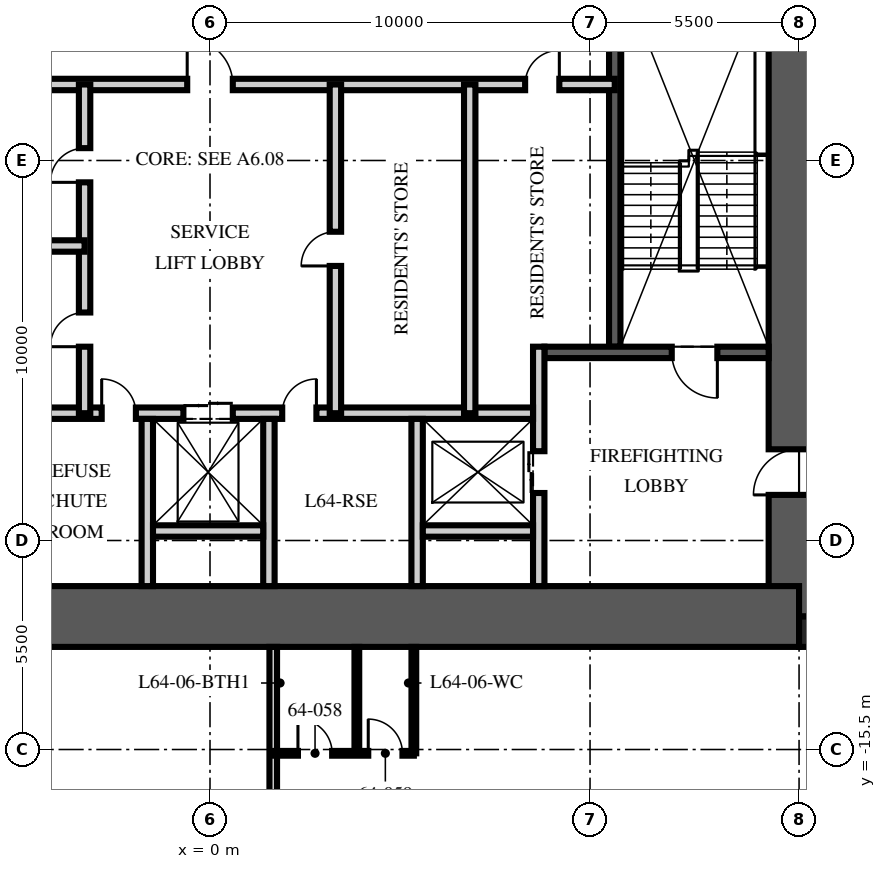
"""IFC4 building model, lengths in metres.
Left out: names, types, materials, properties, quantities, classifications, styles, units other than length and angle.
Written with IfcOpenShell. Run it as: python <this file> out.ifc"""

import sys

from ifc_helpers import new_model, si_unit, direction, frame, frame_2d, origin, origin_2d, place, context, subcontext, project, spatial, rectangle, extrude, element, fill, save


model = new_model("IFC4")
c1 = context("Model", 3, precision=1e-05, world=origin(), true_north=direction((0.0, 1.0)))
c2 = subcontext(c1, "Body", "Model", "MODEL_VIEW")
j1 = project(units=[si_unit("LENGTHUNIT", "METRE"), si_unit("PLANEANGLEUNIT", "RADIAN")], contexts=[c1])
p1 = place(None, origin())
s1 = spatial("IfcSite", under=j1, at=p1, CompositionType="ELEMENT")
p2 = place(p1, origin())
s2 = spatial("IfcBuilding", under=s1, at=p2, CompositionType="ELEMENT")
p3 = place(p2, frame((0.0, 0.0, 255.75)))
s3 = spatial("IfcBuildingStorey", under=s2, at=p3, CompositionType="ELEMENT", Elevation=255.75)
p4 = place(p3, frame((15.5, -12.0, -0.25), z_axis=(0.0, 0.0, 1.0), x_axis=(0.0, 1.0, 0.0)))
e1 = element("IfcWall", 1, at=p4, inside=s3, PredefinedType="SHEAR", context=c2, shape_type="SweptSolid", body=[
    extrude(rectangle(XDim=24.0, YDim=1.6, at=frame_2d((12.0, 0.0))), origin(), (0.0, 0.0, 1.0), 3.75),
])
p5 = place(p4, frame((3.2, 0.0, 0.25)))
e2 = element("IfcOpeningElement", 2, at=p5, cuts=e1, PredefinedType="OPENING", context=c2, shape_type="SweptSolid", body=[
    extrude(rectangle(XDim=1.2, YDim=2.1, at=frame_2d((0.6, 1.05))), frame((0.0, 0.81, 0.0), z_axis=(0.0, -1.0, 0.0), x_axis=(1.0, 0.0, 0.0)), (0.0, 0.0, 1.0), 1.62),
])
p6 = place(p4, frame((19.3, 0.0, 0.25)))
e3 = element("IfcOpeningElement", 3, at=p6, cuts=e1, PredefinedType="OPENING", context=c2, shape_type="SweptSolid", body=[
    extrude(rectangle(XDim=1.8, YDim=2.1, at=frame_2d((0.9, 1.05))), frame((0.0, 0.81, 0.0), z_axis=(0.0, -1.0, 0.0), x_axis=(1.0, 0.0, 0.0)), (0.0, 0.0, 1.0), 1.62),
])
p7 = place(p3, frame((-15.5, -12.0, -0.25), z_axis=(0.0, 0.0, 1.0), x_axis=(1.0, 0.0, 0.0)))
e4 = element("IfcWall", 4, at=p7, inside=s3, PredefinedType="SHEAR", context=c2, shape_type="SweptSolid", body=[
    extrude(rectangle(XDim=31.0, YDim=1.6, at=frame_2d((15.5, 0.0))), origin(), (0.0, 0.0, 1.0), 3.75),
])
p8 = place(p3, frame((15.9, -12.4, -0.25), z_axis=(0.0, 0.0, 1.0), x_axis=(1.0, 0.0, 0.0)))
e5 = element("IfcColumn", 5, at=p8, inside=s3, PredefinedType="COLUMN", context=c2, shape_type="SweptSolid", body=[
    extrude(rectangle(XDim=0.8, YDim=0.8, at=origin_2d()), origin(), (0.0, 0.0, 1.0), 3.75),
])
p9 = place(p3, frame((10.65, -4.9, 0.0), z_axis=(0.0, 0.0, 1.0), x_axis=(0.0, 1.0, 0.0)))
e6 = element("IfcWall", 6, at=p9, inside=s3, PredefinedType="SOLIDWALL", context=c2, shape_type="SweptSolid", body=[
    extrude(rectangle(XDim=10.1, YDim=0.3, at=frame_2d((5.05, 0.0))), origin(), (0.0, 0.0, 1.0), 3.5),
])
p10 = place(p3, frame((14.7, -5.05, 0.0), z_axis=(0.0, 0.0, 1.0), x_axis=(-1.0, 0.0, 0.0)))
e7 = element("IfcWall", 7, at=p10, inside=s3, PredefinedType="SOLIDWALL", context=c2, shape_type="SweptSolid", body=[
    extrude(rectangle(XDim=5.9, YDim=0.3, at=frame_2d((2.95, 0.0))), origin(), (0.0, 0.0, 1.0), 3.5),
])
p11 = place(p10, frame((1.35, 0.0, 0.0)))
e8 = element("IfcOpeningElement", 8, at=p11, cuts=e7, PredefinedType="OPENING", context=c2, shape_type="SweptSolid", body=[
    extrude(rectangle(XDim=1.2, YDim=2.1, at=frame_2d((0.6, 1.05))), frame((0.0, 0.16, 0.0), z_axis=(0.0, -1.0, 0.0), x_axis=(1.0, 0.0, 0.0)), (0.0, 0.0, 1.0), 0.32),
])
p12 = place(p3, frame((8.65, -11.2, 0.0), z_axis=(0.0, 0.0, 1.0), x_axis=(0.0, 1.0, 0.0)))
e9 = element("IfcWall", 9, at=p12, inside=s3, PredefinedType="PARTITIONING", context=c2, shape_type="SweptSolid", body=[
    extrude(rectangle(XDim=6.3, YDim=0.3, at=frame_2d((3.15, 0.0))), origin(), (0.0, 0.0, 1.0), 3.5),
])
p13 = place(p12, frame((2.45, 0.0, 0.0)))
e10 = element("IfcOpeningElement", 10, at=p13, cuts=e9, PredefinedType="OPENING", context=c2, shape_type="SweptSolid", body=[
    extrude(rectangle(XDim=1.1, YDim=2.1, at=frame_2d((0.55, 1.05))), frame((0.0, 0.16, 0.0), z_axis=(0.0, -1.0, 0.0), x_axis=(1.0, 0.0, 0.0)), (0.0, 0.0, 1.0), 0.32),
])
p14 = place(p3, frame((-8.5, -6.65, 0.0), z_axis=(0.0, 0.0, 1.0), x_axis=(1.0, 0.0, 0.0)))
e11 = element("IfcWall", 11, at=p14, inside=s3, PredefinedType="PARTITIONING", context=c2, shape_type="SweptSolid", body=[
    extrude(rectangle(XDim=17.0, YDim=0.3, at=frame_2d((8.5, 0.0))), origin(), (0.0, 0.0, 1.0), 3.5),
])
p15 = place(p14, frame((7.8, 0.0, 0.0)))
e12 = element("IfcOpeningElement", 12, at=p15, cuts=e11, PredefinedType="OPENING", context=c2, shape_type="SweptSolid", body=[
    extrude(rectangle(XDim=1.3, YDim=2.4, at=frame_2d((0.65, 1.2))), frame((0.0, 0.16, 0.0), z_axis=(0.0, -1.0, 0.0), x_axis=(1.0, 0.0, 0.0)), (0.0, 0.0, 1.0), 0.32),
])
p16 = place(p14, frame((5.65, 0.0, 0.0)))
e13 = element("IfcOpeningElement", 13, at=p16, cuts=e11, PredefinedType="OPENING", context=c2, shape_type="SweptSolid", body=[
    extrude(rectangle(XDim=0.9, YDim=2.1, at=frame_2d((0.45, 1.05))), frame((0.0, 0.16, 0.0), z_axis=(0.0, -1.0, 0.0), x_axis=(1.0, 0.0, 0.0)), (0.0, 0.0, 1.0), 0.32),
])
p17 = place(p14, frame((10.4, 0.0, 0.0)))
e14 = element("IfcOpeningElement", 14, at=p17, cuts=e11, PredefinedType="OPENING", context=c2, shape_type="SweptSolid", body=[
    extrude(rectangle(XDim=0.9, YDim=2.1, at=frame_2d((0.45, 1.05))), frame((0.0, 0.16, 0.0), z_axis=(0.0, -1.0, 0.0), x_axis=(1.0, 0.0, 0.0)), (0.0, 0.0, 1.0), 0.32),
])
for number, where, z_axis, x_axis in (
    (15, (-1.65, -11.2, 0.0), (0.0, 0.0, 1.0), (0.0, 1.0, 0.0)),
    (16, (1.55, -11.2, 0.0), (0.0, 0.0, 1.0), (0.0, 1.0, 0.0)),
    (17, (5.45, -11.2, 0.0), (0.0, 0.0, 1.0), (0.0, 1.0, 0.0)),
):
    element("IfcWall", number, at=place(p3, frame(where, z_axis=z_axis, x_axis=x_axis)), inside=s3, PredefinedType="PARTITIONING", context=c2, shape_type="SweptSolid", body=[
        extrude(rectangle(XDim=4.4, YDim=0.3, at=frame_2d((2.2, 0.0))), origin(), (0.0, 0.0, 1.0), 3.5),
    ])
for number, where, z_axis, x_axis in (
    (18, (-1.5, -9.75, 0.0), (0.0, 0.0, 1.0), (1.0, 0.0, 0.0)),
    (19, (5.6, -9.75, 0.0), (0.0, 0.0, 1.0), (1.0, 0.0, 0.0)),
):
    element("IfcWall", number, at=place(p3, frame(where, z_axis=z_axis, x_axis=x_axis)), inside=s3, PredefinedType="PARTITIONING", context=c2, shape_type="SweptSolid", body=[
        extrude(rectangle(XDim=2.9, YDim=0.3, at=frame_2d((1.45, 0.0))), origin(), (0.0, 0.0, 1.0), 3.5),
    ])
p18 = place(p3, frame((-10.65, 2.0, 0.0), z_axis=(0.0, 0.0, 1.0), x_axis=(1.0, 0.0, 0.0)))
e20 = element("IfcWall", 20, at=p18, inside=s3, PredefinedType="PARTITIONING", context=c2, shape_type="SweptSolid", body=[
    extrude(rectangle(XDim=21.3, YDim=0.3, at=frame_2d((10.65, 0.0))), origin(), (0.0, 0.0, 1.0), 3.5),
])
p19 = place(p18, frame((10.05, 0.0, 0.0)))
e21 = element("IfcOpeningElement", 21, at=p19, cuts=e20, PredefinedType="OPENING", context=c2, shape_type="SweptSolid", body=[
    extrude(rectangle(XDim=1.2, YDim=2.1, at=frame_2d((0.6, 1.05))), frame((0.0, 0.16, 0.0), z_axis=(0.0, -1.0, 0.0), x_axis=(1.0, 0.0, 0.0)), (0.0, 0.0, 1.0), 0.32),
])
p20 = place(p18, frame((18.942, 0.0, 0.0)))
e22 = element("IfcOpeningElement", 22, at=p20, cuts=e20, PredefinedType="OPENING", context=c2, shape_type="SweptSolid", body=[
    extrude(rectangle(XDim=0.9, YDim=2.1, at=frame_2d((0.45, 1.05))), frame((0.0, 0.16, 0.0), z_axis=(0.0, -1.0, 0.0), x_axis=(1.0, 0.0, 0.0)), (0.0, 0.0, 1.0), 0.32),
])
p21 = place(p3, frame((-3.3, -6.65, 0.0), z_axis=(0.0, 0.0, 1.0), x_axis=(0.0, 1.0, 0.0)))
e23 = element("IfcWall", 23, at=p21, inside=s3, PredefinedType="PARTITIONING", context=c2, shape_type="SweptSolid", body=[
    extrude(rectangle(XDim=8.65, YDim=0.3, at=frame_2d((4.325, 0.0))), origin(), (0.0, 0.0, 1.0), 3.5),
])
p22 = place(p21, frame((1.75, 0.0, 0.0)))
e24 = element("IfcOpeningElement", 24, at=p22, cuts=e23, PredefinedType="OPENING", context=c2, shape_type="SweptSolid", body=[
    extrude(rectangle(XDim=0.9, YDim=2.1, at=frame_2d((0.45, 1.05))), frame((0.0, 0.16, 0.0), z_axis=(0.0, -1.0, 0.0), x_axis=(1.0, 0.0, 0.0)), (0.0, 0.0, 1.0), 0.32),
])
p23 = place(p21, frame((6.075, 0.0, 0.0)))
e25 = element("IfcOpeningElement", 25, at=p23, cuts=e23, PredefinedType="OPENING", context=c2, shape_type="SweptSolid", body=[
    extrude(rectangle(XDim=0.9, YDim=2.1, at=frame_2d((0.45, 1.05))), frame((0.0, 0.16, 0.0), z_axis=(0.0, -1.0, 0.0), x_axis=(1.0, 0.0, 0.0)), (0.0, 0.0, 1.0), 0.32),
])
p24 = place(p3, frame((3.3, -6.65, 0.0), z_axis=(0.0, 0.0, 1.0), x_axis=(0.0, 1.0, 0.0)))
e26 = element("IfcWall", 26, at=p24, inside=s3, PredefinedType="PARTITIONING", context=c2, shape_type="SweptSolid", body=[
    extrude(rectangle(XDim=8.65, YDim=0.3, at=frame_2d((4.325, 0.0))), origin(), (0.0, 0.0, 1.0), 3.5),
])
p25 = place(p24, frame((3.875, 0.0, 0.0)))
e27 = element("IfcOpeningElement", 27, at=p25, cuts=e26, PredefinedType="OPENING", context=c2, shape_type="SweptSolid", body=[
    extrude(rectangle(XDim=0.9, YDim=2.1, at=frame_2d((0.45, 1.05))), frame((0.0, 0.16, 0.0), z_axis=(0.0, -1.0, 0.0), x_axis=(1.0, 0.0, 0.0)), (0.0, 0.0, 1.0), 0.32),
])
p26 = place(p3, frame((-10.65, -2.25, 0.0), z_axis=(0.0, 0.0, 1.0), x_axis=(1.0, 0.0, 0.0)))
e28 = element("IfcWall", 28, at=p26, inside=s3, PredefinedType="PARTITIONING", context=c2, shape_type="SweptSolid", body=[
    extrude(rectangle(XDim=7.35, YDim=0.3, at=frame_2d((3.675, 0.0))), origin(), (0.0, 0.0, 1.0), 3.5),
])
p27 = place(p3, frame((6.834, -6.65, 0.0), z_axis=(0.0, 0.0, 1.0), x_axis=(0.0, 1.0, 0.0)))
e29 = element("IfcWall", 29, at=p27, inside=s3, PredefinedType="PARTITIONING", context=c2, shape_type="SweptSolid", body=[
    extrude(rectangle(XDim=8.65, YDim=0.3, at=frame_2d((4.325, 0.0))), origin(), (0.0, 0.0, 1.0), 3.5),
])
p28 = place(p3, frame((1.664, -12.8, 0.0), z_axis=(0.0, 0.0, 1.0), x_axis=(0.0, -1.0, 0.0)))
e30 = element("IfcWall", 30, at=p28, inside=s3, PredefinedType="PARTITIONING", context=c2, shape_type="SweptSolid", body=[
    extrude(rectangle(XDim=12.9, YDim=0.2, at=frame_2d((6.45, 0.0))), origin(), (0.0, 0.0, 1.0), 2.91),
])
p29 = place(p3, frame((1.664, -15.6, 0.0), z_axis=(0.0, 0.0, 1.0), x_axis=(1.0, 0.0, 0.0)))
e31 = element("IfcWall", 31, at=p29, inside=s3, PredefinedType="PARTITIONING", context=c2, shape_type="SweptSolid", body=[
    extrude(rectangle(XDim=3.7, YDim=0.125, at=frame_2d((1.85, 0.0))), origin(), (0.0, 0.0, 1.0), 2.81),
])
p30 = place(p29, frame((0.65, 0.0, 0.0)))
e32 = element("IfcOpeningElement", 32, at=p30, cuts=e31, PredefinedType="OPENING", context=c2, shape_type="SweptSolid", body=[
    extrude(rectangle(XDim=0.9, YDim=2.1, at=frame_2d((0.45, 1.05))), frame((0.0, 0.073, 0.0), z_axis=(0.0, -1.0, 0.0), x_axis=(1.0, 0.0, 0.0)), (0.0, 0.0, 1.0), 0.145),
])
p31 = place(p29, frame((2.5, 0.0, 0.0)))
e33 = element("IfcOpeningElement", 33, at=p31, cuts=e31, PredefinedType="OPENING", context=c2, shape_type="SweptSolid", body=[
    extrude(rectangle(XDim=0.9, YDim=2.1, at=frame_2d((0.45, 1.05))), frame((0.0, 0.073, 0.0), z_axis=(0.0, -1.0, 0.0), x_axis=(1.0, 0.0, 0.0)), (0.0, 0.0, 1.0), 0.145),
])
for number, where, z_axis, x_axis in (
    (34, (3.864, -12.8, 0.0), (0.0, 0.0, 1.0), (0.0, -1.0, 0.0)),
    (35, (5.364, -12.8, 0.0), (0.0, 0.0, 1.0), (0.0, -1.0, 0.0)),
):
    element("IfcWall", number, at=place(p3, frame(where, z_axis=z_axis, x_axis=x_axis)), inside=s3, PredefinedType="PARTITIONING", context=c2, shape_type="SweptSolid", body=[
        extrude(rectangle(XDim=2.8, YDim=0.125, at=frame_2d((1.4, 0.0))), origin(), (0.0, 0.0, 1.0), 3.5),
    ])
p32 = place(p11, origin())
e36 = element("IfcDoor", 36, at=p32, inside=s3, OperationType="SINGLE_SWING_LEFT", PredefinedType="DOOR", context=c2, shape_type="SweptSolid", body=[
    extrude(rectangle(XDim=1.2, YDim=2.1, at=frame_2d((0.6, 1.05))), frame((0.0, 0.025, 0.0), z_axis=(0.0, -1.0, 0.0), x_axis=(1.0, 0.0, 0.0)), (0.0, 0.0, 1.0), 0.05),
])
fill(e8, e36)
p33 = place(p5, origin())
e37 = element("IfcDoor", 37, at=p33, inside=s3, OperationType="SINGLE_SWING_LEFT", PredefinedType="DOOR", context=c2, shape_type="SweptSolid", body=[
    extrude(rectangle(XDim=1.2, YDim=2.1, at=frame_2d((0.6, 1.05))), frame((0.0, 0.025, 0.0), z_axis=(0.0, -1.0, 0.0), x_axis=(1.0, 0.0, 0.0)), (0.0, 0.0, 1.0), 0.05),
])
fill(e2, e37)
p34 = place(p13, origin())
e38 = element("IfcDoor", 38, at=p34, inside=s3, OperationType="DOUBLE_DOOR_SLIDING", PredefinedType="DOOR", context=c2, shape_type="SweptSolid", body=[
    extrude(rectangle(XDim=1.1, YDim=2.1, at=frame_2d((0.55, 1.05))), frame((0.0, 0.025, 0.0), z_axis=(0.0, -1.0, 0.0), x_axis=(1.0, 0.0, 0.0)), (0.0, 0.0, 1.0), 0.05),
])
fill(e10, e38)
p35 = place(p15, origin())
e39 = element("IfcDoor", 39, at=p35, inside=s3, OperationType="DOUBLE_DOOR_SLIDING", PredefinedType="DOOR", context=c2, shape_type="SweptSolid", body=[
    extrude(rectangle(XDim=1.3, YDim=2.4, at=frame_2d((0.65, 1.2))), frame((0.0, 0.025, 0.0), z_axis=(0.0, -1.0, 0.0), x_axis=(1.0, 0.0, 0.0)), (0.0, 0.0, 1.0), 0.05),
])
fill(e12, e39)
p36 = place(p19, origin())
e40 = element("IfcDoor", 40, at=p36, inside=s3, OperationType="SINGLE_SWING_LEFT", PredefinedType="DOOR", context=c2, shape_type="SweptSolid", body=[
    extrude(rectangle(XDim=1.2, YDim=2.1, at=frame_2d((0.6, 1.05))), frame((0.0, 0.025, 0.0), z_axis=(0.0, -1.0, 0.0), x_axis=(1.0, 0.0, 0.0)), (0.0, 0.0, 1.0), 0.05),
])
fill(e21, e40)
p37 = place(p16, origin())
e41 = element("IfcDoor", 41, at=p37, inside=s3, OperationType="SINGLE_SWING_LEFT", PredefinedType="DOOR", context=c2, shape_type="SweptSolid", body=[
    extrude(rectangle(XDim=0.9, YDim=2.1, at=frame_2d((0.45, 1.05))), frame((0.0, 0.025, 0.0), z_axis=(0.0, -1.0, 0.0), x_axis=(1.0, 0.0, 0.0)), (0.0, 0.0, 1.0), 0.05),
])
fill(e13, e41)
p38 = place(p17, origin())
e42 = element("IfcDoor", 42, at=p38, inside=s3, OperationType="SINGLE_SWING_RIGHT", PredefinedType="DOOR", context=c2, shape_type="SweptSolid", body=[
    extrude(rectangle(XDim=0.9, YDim=2.1, at=frame_2d((0.45, 1.05))), frame((0.0, 0.025, 0.0), z_axis=(0.0, -1.0, 0.0), x_axis=(1.0, 0.0, 0.0)), (0.0, 0.0, 1.0), 0.05),
])
fill(e14, e42)
p39 = place(p22, origin())
e43 = element("IfcDoor", 43, at=p39, inside=s3, OperationType="SINGLE_SWING_LEFT", PredefinedType="DOOR", context=c2, shape_type="SweptSolid", body=[
    extrude(rectangle(XDim=0.9, YDim=2.1, at=frame_2d((0.45, 1.05))), frame((0.0, 0.025, 0.0), z_axis=(0.0, -1.0, 0.0), x_axis=(1.0, 0.0, 0.0)), (0.0, 0.0, 1.0), 0.05),
])
fill(e24, e43)
p40 = place(p23, origin())
e44 = element("IfcDoor", 44, at=p40, inside=s3, OperationType="SINGLE_SWING_LEFT", PredefinedType="DOOR", context=c2, shape_type="SweptSolid", body=[
    extrude(rectangle(XDim=0.9, YDim=2.1, at=frame_2d((0.45, 1.05))), frame((0.0, 0.025, 0.0), z_axis=(0.0, -1.0, 0.0), x_axis=(1.0, 0.0, 0.0)), (0.0, 0.0, 1.0), 0.05),
])
fill(e25, e44)
p41 = place(p25, origin())
e45 = element("IfcDoor", 45, at=p41, inside=s3, OperationType="SINGLE_SWING_LEFT", PredefinedType="DOOR", context=c2, shape_type="SweptSolid", body=[
    extrude(rectangle(XDim=0.9, YDim=2.1, at=frame_2d((0.45, 1.05))), frame((0.0, 0.025, 0.0), z_axis=(0.0, -1.0, 0.0), x_axis=(1.0, 0.0, 0.0)), (0.0, 0.0, 1.0), 0.05),
])
fill(e27, e45)
p42 = place(p20, origin())
e46 = element("IfcDoor", 46, at=p42, inside=s3, OperationType="SINGLE_SWING_RIGHT", PredefinedType="DOOR", context=c2, shape_type="SweptSolid", body=[
    extrude(rectangle(XDim=0.9, YDim=2.1, at=frame_2d((0.45, 1.05))), frame((0.0, 0.025, 0.0), z_axis=(0.0, -1.0, 0.0), x_axis=(1.0, 0.0, 0.0)), (0.0, 0.0, 1.0), 0.05),
])
fill(e22, e46)
p43 = place(p30, origin())
e47 = element("IfcDoor", 47, at=p43, inside=s3, OperationType="SINGLE_SWING_LEFT", PredefinedType="DOOR", context=c2, shape_type="SweptSolid", body=[
    extrude(rectangle(XDim=0.9, YDim=2.1, at=frame_2d((0.45, 1.05))), frame((0.0, 0.025, 0.0), z_axis=(0.0, -1.0, 0.0), x_axis=(1.0, 0.0, 0.0)), (0.0, 0.0, 1.0), 0.05),
])
fill(e32, e47)
p44 = place(p31, origin())
e48 = element("IfcDoor", 48, at=p44, inside=s3, OperationType="SINGLE_SWING_LEFT", PredefinedType="DOOR", context=c2, shape_type="SweptSolid", body=[
    extrude(rectangle(XDim=0.9, YDim=2.1, at=frame_2d((0.45, 1.05))), frame((0.0, 0.025, 0.0), z_axis=(0.0, -1.0, 0.0), x_axis=(1.0, 0.0, 0.0)), (0.0, 0.0, 1.0), 0.05),
])
fill(e33, e48)
save(model, sys.argv[1])
